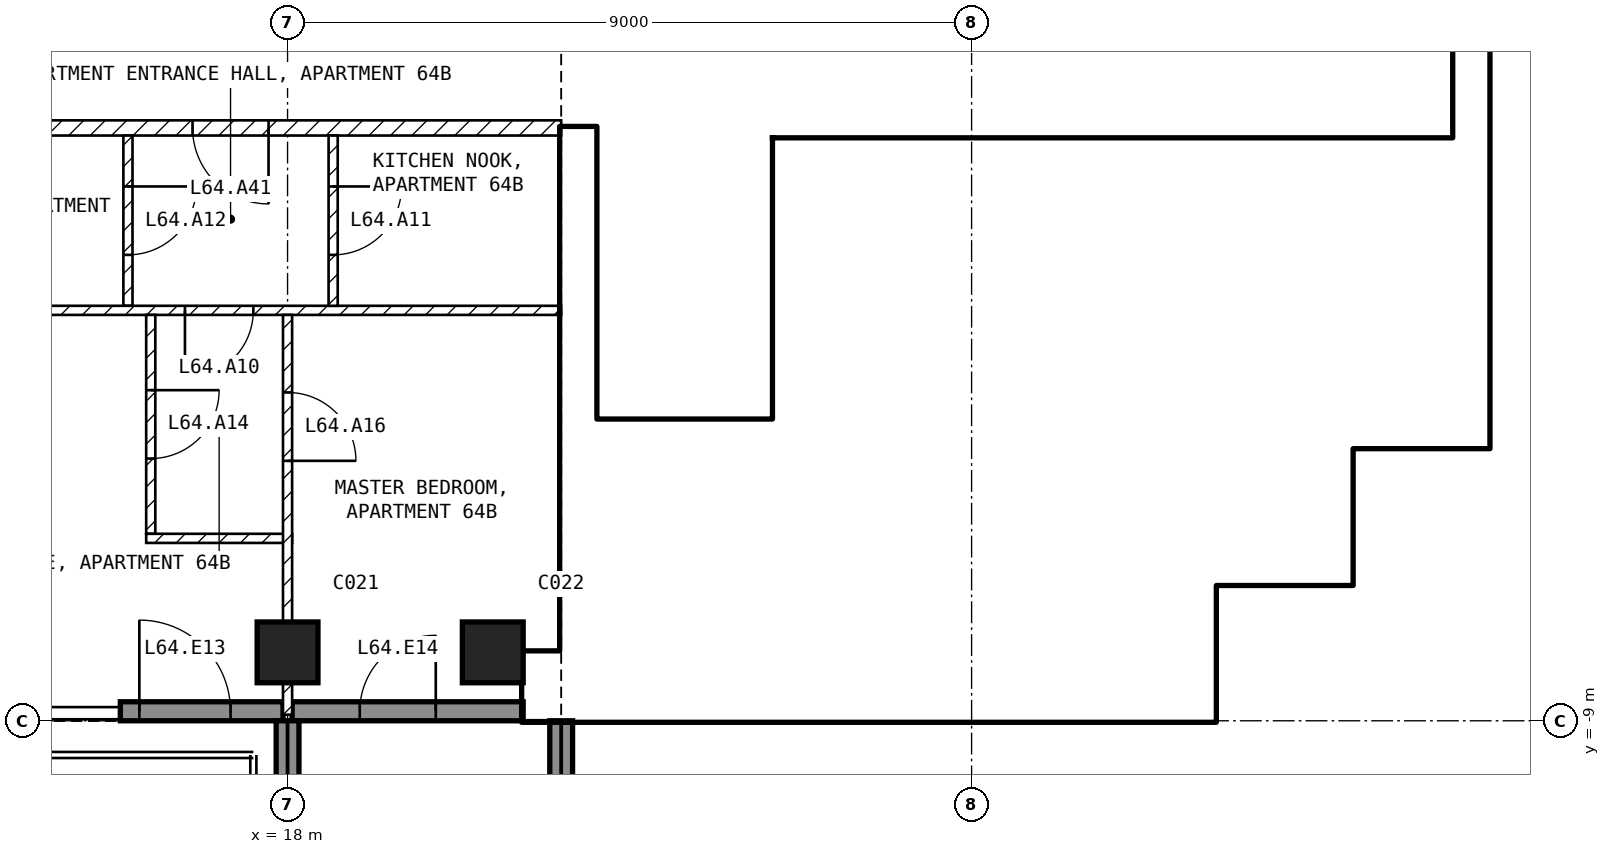
"""IFC4 building model, lengths in metres.
Left out: names, types, materials, properties, quantities, classifications, styles, units other than length and angle.
Written with IfcOpenShell. Run it as: python <this file> out.ifc"""

import sys

from ifc_helpers import new_model, si_unit, direction, frame, frame_2d, origin, origin_2d, place, context, subcontext, project, spatial, rectangle, extrude, element, fill, save


model = new_model("IFC4")
c1 = context("Model", 3, precision=1e-05, world=origin(), true_north=direction((0.0, 1.0)))
c2 = subcontext(c1, "Body", "Model", "MODEL_VIEW")
j1 = project(units=[si_unit("LENGTHUNIT", "METRE"), si_unit("PLANEANGLEUNIT", "RADIAN")], contexts=[c1])
p1 = place(None, origin())
s1 = spatial("IfcSite", under=j1, at=p1, CompositionType="ELEMENT")
p2 = place(p1, origin())
s2 = spatial("IfcBuilding", under=s1, at=p2, CompositionType="ELEMENT")
p3 = place(p2, frame((0.0, 0.0, 253.5)))
s3 = spatial("IfcBuildingStorey", under=s2, at=p3, CompositionType="ELEMENT", Elevation=253.5)
for number, where, z_axis, x_axis in (
    (1, (18.0, -8.1, -0.25), (0.0, 0.0, 1.0), (1.0, 0.0, 0.0)),
    (2, (20.7, -8.1, -0.25), (0.0, 0.0, 1.0), (1.0, 0.0, 0.0)),
):
    element("IfcColumn", number, at=place(p3, frame(where, z_axis=z_axis, x_axis=x_axis)), inside=s3, PredefinedType="COLUMN", context=c2, shape_type="SweptSolid", body=[
        extrude(rectangle(XDim=0.8, YDim=0.8, at=origin_2d()), origin(), (0.0, 0.0, 1.0), 3.5),
    ])
p4 = place(p3, frame((15.8, -8.875, 0.0), z_axis=(0.0, 0.0, 1.0), x_axis=(1.0, 0.0, 0.0)))
e3 = element("IfcWall", 3, at=p4, inside=s3, PredefinedType="SOLIDWALL", context=c2, shape_type="SweptSolid", body=[
    extrude(rectangle(XDim=2.14, YDim=0.25, at=frame_2d((1.07, 0.0))), origin(), (0.0, 0.0, 1.0), 3.25),
])
p5 = place(p4, frame((0.25, 0.0, 0.0)))
e4 = element("IfcOpeningElement", 4, at=p5, cuts=e3, PredefinedType="OPENING", context=c2, shape_type="SweptSolid", body=[
    extrude(rectangle(XDim=1.2, YDim=2.4, at=frame_2d((0.6, 1.2))), frame((0.0, 0.135, 0.0), z_axis=(0.0, -1.0, 0.0), x_axis=(1.0, 0.0, 0.0)), (0.0, 0.0, 1.0), 0.27),
])
p6 = place(p3, frame((18.06, -8.875, 0.0), z_axis=(0.0, 0.0, 1.0), x_axis=(1.0, 0.0, 0.0)))
e5 = element("IfcWall", 5, at=p6, inside=s3, PredefinedType="SOLIDWALL", context=c2, shape_type="SweptSolid", body=[
    extrude(rectangle(XDim=3.04, YDim=0.25, at=frame_2d((1.52, 0.0))), origin(), (0.0, 0.0, 1.0), 3.25),
])
p7 = place(p6, frame((0.89, 0.0, 0.0)))
e6 = element("IfcOpeningElement", 6, at=p7, cuts=e5, PredefinedType="OPENING", context=c2, shape_type="SweptSolid", body=[
    extrude(rectangle(XDim=1.0, YDim=2.4, at=frame_2d((0.5, 1.2))), frame((0.0, 0.135, 0.0), z_axis=(0.0, -1.0, 0.0), x_axis=(1.0, 0.0, 0.0)), (0.0, 0.0, 1.0), 0.27),
])
p8 = place(p3, frame((18.0, -9.0, 0.0), z_axis=(0.0, 0.0, 1.0), x_axis=(0.0, -1.0, 0.0)))
e7 = element("IfcWall", 7, at=p8, inside=s3, PredefinedType="SOLIDWALL", context=c2, shape_type="SweptSolid", body=[
    extrude(rectangle(XDim=2.74, YDim=0.3, at=frame_2d((1.37, 0.0))), origin(), (0.0, 0.0, 1.0), 3.25),
])
p9 = place(p3, frame((21.6, -9.0, 0.0), z_axis=(0.0, 0.0, 1.0), x_axis=(0.0, -1.0, 0.0)))
e8 = element("IfcWall", 8, at=p9, inside=s3, PredefinedType="SOLIDWALL", context=c2, shape_type="SweptSolid", body=[
    extrude(rectangle(XDim=2.7, YDim=0.3, at=frame_2d((1.35, 0.0))), origin(), (0.0, 0.0, 1.0), 3.25),
])
p10 = place(p3, frame((21.1, -8.55, 0.0), z_axis=(0.0, 0.0, 1.0), x_axis=(1.0, 0.0, 0.0)))
e9 = element("IfcWall", 9, at=p10, inside=s3, PredefinedType="SHEAR", context=c2, shape_type="SweptSolid", body=[
    extrude(rectangle(XDim=9.1, YDim=0.9, at=frame_2d((4.55, 0.0))), origin(), (0.0, 0.0, 1.0), 3.25),
])
p11 = place(p3, frame((29.975, -8.1, 0.0), z_axis=(0.0, 0.0, 1.0), x_axis=(0.0, 1.0, 0.0)))
e10 = element("IfcWall", 10, at=p11, inside=s3, PredefinedType="SHEAR", context=c2, shape_type="SweptSolid", body=[
    extrude(rectangle(XDim=1.35, YDim=0.45, at=frame_2d((0.675, 0.0))), origin(), (0.0, 0.0, 1.0), 3.25),
])
for number, where, z_axis, x_axis in (
    (11, (30.2, -6.975, 0.0), (0.0, 0.0, 1.0), (1.0, 0.0, 0.0)),
    (12, (31.775, -6.75, 0.0), (0.0, 0.0, 1.0), (0.0, 1.0, 0.0)),
    (13, (32.0, -5.175, 0.0), (0.0, 0.0, 1.0), (1.0, 0.0, 0.0)),
):
    element("IfcWall", number, at=place(p3, frame(where, z_axis=z_axis, x_axis=x_axis)), inside=s3, PredefinedType="SHEAR", context=c2, shape_type="SweptSolid", body=[
        extrude(rectangle(XDim=1.8, YDim=0.45, at=frame_2d((0.9, 0.0))), origin(), (0.0, 0.0, 1.0), 3.25),
    ])
p12 = place(p3, frame((33.575, -4.95, 0.0), z_axis=(0.0, 0.0, 1.0), x_axis=(0.0, 1.0, 0.0)))
e14 = element("IfcWall", 14, at=p12, inside=s3, PredefinedType="SHEAR", context=c2, shape_type="SweptSolid", body=[
    extrude(rectangle(XDim=10.35, YDim=0.45, at=frame_2d((5.175, 0.0))), origin(), (0.0, 0.0, 1.0), 3.25),
])
p13 = place(p3, frame((21.825, -8.1, 0.0), z_axis=(0.0, 0.0, 1.0), x_axis=(0.0, 1.0, 0.0)))
e15 = element("IfcWall", 15, at=p13, inside=s3, PredefinedType="SHEAR", context=c2, shape_type="SweptSolid", body=[
    extrude(rectangle(XDim=6.9, YDim=0.45, at=frame_2d((3.45, 0.0))), origin(), (0.0, 0.0, 1.0), 3.25),
])
p14 = place(p3, frame((24.5, -5.05, 0.0), z_axis=(0.0, 0.0, 1.0), x_axis=(0.0, 1.0, 0.0)))
e16 = element("IfcWall", 16, at=p14, inside=s3, PredefinedType="SOLIDWALL", context=c2, shape_type="SweptSolid", body=[
    extrude(rectangle(XDim=3.7, YDim=0.2, at=frame_2d((1.85, 0.0))), origin(), (0.0, 0.0, 1.0), 3.25),
])
p15 = place(p14, frame((0.1, 0.0, 0.0)))
e17 = element("IfcOpeningElement", 17, at=p15, cuts=e16, PredefinedType="OPENING", context=c2, shape_type="SweptSolid", body=[
    extrude(rectangle(XDim=0.8, YDim=2.1, at=frame_2d((0.4, 1.05))), frame((0.0, 0.11, 0.0), z_axis=(0.0, -1.0, 0.0), x_axis=(1.0, 0.0, 0.0)), (0.0, 0.0, 1.0), 0.22),
])
p16 = place(p3, frame((22.05, -5.15, 0.0), z_axis=(0.0, 0.0, 1.0), x_axis=(1.0, 0.0, 0.0)))
e18 = element("IfcWall", 18, at=p16, inside=s3, PredefinedType="SOLIDWALL", context=c2, shape_type="SweptSolid", body=[
    extrude(rectangle(XDim=6.3, YDim=0.2, at=frame_2d((3.15, 0.0))), origin(), (0.0, 0.0, 1.0), 3.25),
])
p17 = place(p16, frame((0.2, 0.0, 0.0)))
e19 = element("IfcOpeningElement", 19, at=p17, cuts=e18, PredefinedType="OPENING", context=c2, shape_type="SweptSolid", body=[
    extrude(rectangle(XDim=1.0, YDim=2.1, at=frame_2d((0.5, 1.05))), frame((0.0, 0.11, 0.0), z_axis=(0.0, -1.0, 0.0), x_axis=(1.0, 0.0, 0.0)), (0.0, 0.0, 1.0), 0.22),
])
p18 = place(p3, frame((28.25, -8.1, 0.0), z_axis=(0.0, 0.0, 1.0), x_axis=(0.0, 1.0, 0.0)))
e20 = element("IfcWall", 20, at=p18, inside=s3, PredefinedType="SOLIDWALL", context=c2, shape_type="SweptSolid", body=[
    extrude(rectangle(XDim=2.85, YDim=0.2, at=frame_2d((1.425, 0.0))), origin(), (0.0, 0.0, 1.0), 3.25),
])
p19 = place(p3, frame((24.6, -1.45, 0.0), z_axis=(0.0, 0.0, 1.0), x_axis=(1.0, 0.0, 0.0)))
e21 = element("IfcWall", 21, at=p19, inside=s3, PredefinedType="SOLIDWALL", context=c2, shape_type="SweptSolid", body=[
    extrude(rectangle(XDim=8.75, YDim=0.2, at=frame_2d((4.375, 0.0))), origin(), (0.0, 0.0, 1.0), 3.25),
])
p20 = place(p19, frame((0.4, 0.0, 0.0)))
e22 = element("IfcOpeningElement", 22, at=p20, cuts=e21, PredefinedType="OPENING", context=c2, shape_type="SweptSolid", body=[
    extrude(rectangle(XDim=1.0, YDim=2.1, at=frame_2d((0.5, 1.05))), frame((0.0, 0.11, 0.0), z_axis=(0.0, -1.0, 0.0), x_axis=(1.0, 0.0, 0.0)), (0.0, 0.0, 1.0), 0.22),
])
p21 = place(p19, frame((2.4, 0.0, 0.0)))
e23 = element("IfcOpeningElement", 23, at=p21, cuts=e21, PredefinedType="OPENING", context=c2, shape_type="SweptSolid", body=[
    extrude(rectangle(XDim=1.0, YDim=2.1, at=frame_2d((0.5, 1.05))), frame((0.0, 0.11, 0.0), z_axis=(0.0, -1.0, 0.0), x_axis=(1.0, 0.0, 0.0)), (0.0, 0.0, 1.0), 0.22),
])
p22 = place(p19, frame((4.4, 0.0, 0.0)))
e24 = element("IfcOpeningElement", 24, at=p22, cuts=e21, PredefinedType="OPENING", context=c2, shape_type="SweptSolid", body=[
    extrude(rectangle(XDim=1.0, YDim=2.1, at=frame_2d((0.5, 1.05))), frame((0.0, 0.11, 0.0), z_axis=(0.0, -1.0, 0.0), x_axis=(1.0, 0.0, 0.0)), (0.0, 0.0, 1.0), 0.22),
])
p23 = place(p19, frame((6.925, 0.0, 0.0)))
e25 = element("IfcOpeningElement", 25, at=p23, cuts=e21, PredefinedType="OPENING", context=c2, shape_type="SweptSolid", body=[
    extrude(rectangle(XDim=0.9, YDim=2.1, at=frame_2d((0.45, 1.05))), frame((0.0, 0.11, 0.0), z_axis=(0.0, -1.0, 0.0), x_axis=(1.0, 0.0, 0.0)), (0.0, 0.0, 1.0), 0.22),
])
p24 = place(p3, frame((24.6, -3.95, 0.0), z_axis=(0.0, 0.0, 1.0), x_axis=(1.0, 0.0, 0.0)))
e26 = element("IfcWall", 26, at=p24, inside=s3, PredefinedType="SOLIDWALL", context=c2, shape_type="SweptSolid", body=[
    extrude(rectangle(XDim=8.75, YDim=0.2, at=frame_2d((4.375, 0.0))), origin(), (0.0, 0.0, 1.0), 3.25),
])
for number, where, z_axis, x_axis in (
    (27, (26.5, -3.85, 0.0), (0.0, 0.0, 1.0), (0.0, 1.0, 0.0)),
    (28, (28.5, -3.85, 0.0), (0.0, 0.0, 1.0), (0.0, 1.0, 0.0)),
    (29, (30.5, -3.85, 0.0), (0.0, 0.0, 1.0), (0.0, 1.0, 0.0)),
):
    element("IfcWall", number, at=place(p3, frame(where, z_axis=z_axis, x_axis=x_axis)), inside=s3, PredefinedType="SOLIDWALL", context=c2, shape_type="SweptSolid", body=[
        extrude(rectangle(XDim=2.3, YDim=0.2, at=frame_2d((1.15, 0.0))), origin(), (0.0, 0.0, 1.0), 3.25),
    ])
p25 = place(p3, frame((21.6, -1.2, 0.0), z_axis=(0.0, 0.0, 1.0), x_axis=(-1.0, 0.0, 0.0)))
e30 = element("IfcWall", 30, at=p25, inside=s3, PredefinedType="PARTITIONING", context=c2, shape_type="SweptSolid", body=[
    extrude(rectangle(XDim=17.2, YDim=0.2, at=frame_2d((8.6, 0.0))), origin(), (0.0, 0.0, 1.0), 3.25),
])
p26 = place(p25, frame((3.85, 0.0, 0.0)))
e31 = element("IfcOpeningElement", 31, at=p26, cuts=e30, PredefinedType="OPENING", context=c2, shape_type="SweptSolid", body=[
    extrude(rectangle(XDim=1.0, YDim=2.1, at=frame_2d((0.5, 1.05))), frame((0.0, 0.11, 0.0), z_axis=(0.0, -1.0, 0.0), x_axis=(1.0, 0.0, 0.0)), (0.0, 0.0, 1.0), 0.22),
])
p27 = place(p3, frame((15.9, -1.3, 0.0), z_axis=(0.0, 0.0, 1.0), x_axis=(0.0, -1.0, 0.0)))
e32 = element("IfcWall", 32, at=p27, inside=s3, PredefinedType="PARTITIONING", context=c2, shape_type="SweptSolid", body=[
    extrude(rectangle(XDim=2.24, YDim=0.12, at=frame_2d((1.12, 0.0))), origin(), (0.0, 0.0, 1.0), 3.25),
])
p28 = place(p27, frame((0.67, 0.0, 0.0)))
e33 = element("IfcOpeningElement", 33, at=p28, cuts=e32, PredefinedType="OPENING", context=c2, shape_type="SweptSolid", body=[
    extrude(rectangle(XDim=0.9, YDim=2.1, at=frame_2d((0.45, 1.05))), frame((0.0, 0.07, 0.0), z_axis=(0.0, -1.0, 0.0), x_axis=(1.0, 0.0, 0.0)), (0.0, 0.0, 1.0), 0.14),
])
p29 = place(p3, frame((21.6, -3.6, 0.0), z_axis=(0.0, 0.0, 1.0), x_axis=(-1.0, 0.0, 0.0)))
e34 = element("IfcWall", 34, at=p29, inside=s3, PredefinedType="PARTITIONING", context=c2, shape_type="SweptSolid", body=[
    extrude(rectangle(XDim=9.0, YDim=0.12, at=frame_2d((4.5, 0.0))), origin(), (0.0, 0.0, 1.0), 3.25),
])
p30 = place(p29, frame((4.05, 0.0, 0.0)))
e35 = element("IfcOpeningElement", 35, at=p30, cuts=e34, PredefinedType="OPENING", context=c2, shape_type="SweptSolid", body=[
    extrude(rectangle(XDim=0.9, YDim=2.1, at=frame_2d((0.45, 1.05))), frame((0.0, 0.07, 0.0), z_axis=(0.0, -1.0, 0.0), x_axis=(1.0, 0.0, 0.0)), (0.0, 0.0, 1.0), 0.14),
])
p31 = place(p3, frame((18.6, -1.3, 0.0), z_axis=(0.0, 0.0, 1.0), x_axis=(0.0, -1.0, 0.0)))
e36 = element("IfcWall", 36, at=p31, inside=s3, PredefinedType="PARTITIONING", context=c2, shape_type="SweptSolid", body=[
    extrude(rectangle(XDim=2.24, YDim=0.12, at=frame_2d((1.12, 0.0))), origin(), (0.0, 0.0, 1.0), 3.25),
])
p32 = place(p31, frame((0.67, 0.0, 0.0)))
e37 = element("IfcOpeningElement", 37, at=p32, cuts=e36, PredefinedType="OPENING", context=c2, shape_type="SweptSolid", body=[
    extrude(rectangle(XDim=0.9, YDim=2.1, at=frame_2d((0.45, 1.05))), frame((0.0, 0.07, 0.0), z_axis=(0.0, -1.0, 0.0), x_axis=(1.0, 0.0, 0.0)), (0.0, 0.0, 1.0), 0.14),
])
p33 = place(p3, frame((16.2, -3.66, 0.0), z_axis=(0.0, 0.0, 1.0), x_axis=(0.0, -1.0, 0.0)))
e38 = element("IfcWall", 38, at=p33, inside=s3, PredefinedType="PARTITIONING", context=c2, shape_type="SweptSolid", body=[
    extrude(rectangle(XDim=2.88, YDim=0.12, at=frame_2d((1.44, 0.0))), origin(), (0.0, 0.0, 1.0), 3.25),
])
p34 = place(p33, frame((0.99, 0.0, 0.0)))
e39 = element("IfcOpeningElement", 39, at=p34, cuts=e38, PredefinedType="OPENING", context=c2, shape_type="SweptSolid", body=[
    extrude(rectangle(XDim=0.9, YDim=2.1, at=frame_2d((0.45, 1.05))), frame((0.0, 0.07, 0.0), z_axis=(0.0, -1.0, 0.0), x_axis=(1.0, 0.0, 0.0)), (0.0, 0.0, 1.0), 0.14),
])
p35 = place(p3, frame((16.14, -6.6, 0.0), z_axis=(0.0, 0.0, 1.0), x_axis=(1.0, 0.0, 0.0)))
e40 = element("IfcWall", 40, at=p35, inside=s3, PredefinedType="PARTITIONING", context=c2, shape_type="SweptSolid", body=[
    extrude(rectangle(XDim=1.92, YDim=0.12, at=frame_2d((0.96, 0.0))), origin(), (0.0, 0.0, 1.0), 3.25),
])
p36 = place(p3, frame((18.0, -3.66, 0.0), z_axis=(0.0, 0.0, 1.0), x_axis=(0.0, -1.0, 0.0)))
e41 = element("IfcWall", 41, at=p36, inside=s3, PredefinedType="PARTITIONING", context=c2, shape_type="SweptSolid", body=[
    extrude(rectangle(XDim=5.26, YDim=0.12, at=frame_2d((2.63, 0.0))), origin(), (0.0, 0.0, 1.0), 2.496),
])
p37 = place(p36, frame((1.02, 0.0, 0.0)))
e42 = element("IfcOpeningElement", 42, at=p37, cuts=e41, PredefinedType="OPENING", context=c2, shape_type="SweptSolid", body=[
    extrude(rectangle(XDim=0.9, YDim=2.1, at=frame_2d((0.45, 1.05))), frame((0.0, 0.07, 0.0), z_axis=(0.0, -1.0, 0.0), x_axis=(1.0, 0.0, 0.0)), (0.0, 0.0, 1.0), 0.14),
])
p38 = place(p5, origin())
e43 = element("IfcDoor", 43, at=p38, inside=s3, OperationType="SINGLE_SWING_LEFT", PredefinedType="DOOR", context=c2, shape_type="SweptSolid", body=[
    extrude(rectangle(XDim=1.2, YDim=2.4, at=frame_2d((0.6, 1.2))), frame((0.0, 0.025, 0.0), z_axis=(0.0, -1.0, 0.0), x_axis=(1.0, 0.0, 0.0)), (0.0, 0.0, 1.0), 0.05),
])
fill(e4, e43)
p39 = place(p7, origin())
e44 = element("IfcDoor", 44, at=p39, inside=s3, OperationType="SINGLE_SWING_RIGHT", PredefinedType="DOOR", context=c2, shape_type="SweptSolid", body=[
    extrude(rectangle(XDim=1.0, YDim=2.4, at=frame_2d((0.5, 1.2))), frame((0.0, 0.025, 0.0), z_axis=(0.0, -1.0, 0.0), x_axis=(1.0, 0.0, 0.0)), (0.0, 0.0, 1.0), 0.05),
])
fill(e6, e44)
p40 = place(p20, origin())
e45 = element("IfcDoor", 45, at=p40, inside=s3, OperationType="DOUBLE_DOOR_SLIDING", PredefinedType="DOOR", context=c2, shape_type="SweptSolid", body=[
    extrude(rectangle(XDim=1.0, YDim=2.1, at=frame_2d((0.5, 1.05))), frame((0.0, 0.025, 0.0), z_axis=(0.0, -1.0, 0.0), x_axis=(1.0, 0.0, 0.0)), (0.0, 0.0, 1.0), 0.05),
])
fill(e22, e45)
p41 = place(p21, origin())
e46 = element("IfcDoor", 46, at=p41, inside=s3, OperationType="DOUBLE_DOOR_SLIDING", PredefinedType="DOOR", context=c2, shape_type="SweptSolid", body=[
    extrude(rectangle(XDim=1.0, YDim=2.1, at=frame_2d((0.5, 1.05))), frame((0.0, 0.025, 0.0), z_axis=(0.0, -1.0, 0.0), x_axis=(1.0, 0.0, 0.0)), (0.0, 0.0, 1.0), 0.05),
])
fill(e23, e46)
p42 = place(p22, origin())
e47 = element("IfcDoor", 47, at=p42, inside=s3, OperationType="DOUBLE_DOOR_SLIDING", PredefinedType="DOOR", context=c2, shape_type="SweptSolid", body=[
    extrude(rectangle(XDim=1.0, YDim=2.1, at=frame_2d((0.5, 1.05))), frame((0.0, 0.025, 0.0), z_axis=(0.0, -1.0, 0.0), x_axis=(1.0, 0.0, 0.0)), (0.0, 0.0, 1.0), 0.05),
])
fill(e24, e47)
p43 = place(p17, origin())
e48 = element("IfcDoor", 48, at=p43, inside=s3, OperationType="SINGLE_SWING_LEFT", PredefinedType="DOOR", context=c2, shape_type="SweptSolid", body=[
    extrude(rectangle(XDim=1.0, YDim=2.1, at=frame_2d((0.5, 1.05))), frame((0.0, 0.025, 0.0), z_axis=(0.0, -1.0, 0.0), x_axis=(1.0, 0.0, 0.0)), (0.0, 0.0, 1.0), 0.05),
])
fill(e19, e48)
p44 = place(p15, origin())
e49 = element("IfcDoor", 49, at=p44, inside=s3, OperationType="SINGLE_SWING_LEFT", PredefinedType="DOOR", context=c2, shape_type="SweptSolid", body=[
    extrude(rectangle(XDim=0.8, YDim=2.1, at=frame_2d((0.4, 1.05))), frame((0.0, 0.025, 0.0), z_axis=(0.0, -1.0, 0.0), x_axis=(1.0, 0.0, 0.0)), (0.0, 0.0, 1.0), 0.05),
])
fill(e17, e49)
p45 = place(p23, origin())
e50 = element("IfcDoor", 50, at=p45, inside=s3, OperationType="SINGLE_SWING_LEFT", PredefinedType="DOOR", context=c2, shape_type="SweptSolid", body=[
    extrude(rectangle(XDim=0.9, YDim=2.1, at=frame_2d((0.45, 1.05))), frame((0.0, 0.025, 0.0), z_axis=(0.0, -1.0, 0.0), x_axis=(1.0, 0.0, 0.0)), (0.0, 0.0, 1.0), 0.05),
])
fill(e25, e50)
p46 = place(p30, origin())
e51 = element("IfcDoor", 51, at=p46, inside=s3, OperationType="SINGLE_SWING_RIGHT", PredefinedType="DOOR", context=c2, shape_type="SweptSolid", body=[
    extrude(rectangle(XDim=0.9, YDim=2.1, at=frame_2d((0.45, 1.05))), frame((0.0, 0.025, 0.0), z_axis=(0.0, -1.0, 0.0), x_axis=(1.0, 0.0, 0.0)), (0.0, 0.0, 1.0), 0.05),
])
fill(e35, e51)
p47 = place(p32, origin())
e52 = element("IfcDoor", 52, at=p47, inside=s3, OperationType="SINGLE_SWING_LEFT", PredefinedType="DOOR", context=c2, shape_type="SweptSolid", body=[
    extrude(rectangle(XDim=0.9, YDim=2.1, at=frame_2d((0.45, 1.05))), frame((0.0, 0.025, 0.0), z_axis=(0.0, -1.0, 0.0), x_axis=(1.0, 0.0, 0.0)), (0.0, 0.0, 1.0), 0.05),
])
fill(e37, e52)
p48 = place(p28, origin())
e53 = element("IfcDoor", 53, at=p48, inside=s3, OperationType="SINGLE_SWING_LEFT", PredefinedType="DOOR", context=c2, shape_type="SweptSolid", body=[
    extrude(rectangle(XDim=0.9, YDim=2.1, at=frame_2d((0.45, 1.05))), frame((0.0, 0.025, 0.0), z_axis=(0.0, -1.0, 0.0), x_axis=(1.0, 0.0, 0.0)), (0.0, 0.0, 1.0), 0.05),
])
fill(e33, e53)
p49 = place(p34, origin())
e54 = element("IfcDoor", 54, at=p49, inside=s3, OperationType="SINGLE_SWING_LEFT", PredefinedType="DOOR", context=c2, shape_type="SweptSolid", body=[
    extrude(rectangle(XDim=0.9, YDim=2.1, at=frame_2d((0.45, 1.05))), frame((0.0, 0.025, 0.0), z_axis=(0.0, -1.0, 0.0), x_axis=(1.0, 0.0, 0.0)), (0.0, 0.0, 1.0), 0.05),
])
fill(e39, e54)
p50 = place(p37, origin())
e55 = element("IfcDoor", 55, at=p50, inside=s3, OperationType="SINGLE_SWING_RIGHT", PredefinedType="DOOR", context=c2, shape_type="SweptSolid", body=[
    extrude(rectangle(XDim=0.9, YDim=2.1, at=frame_2d((0.45, 1.05))), frame((0.0, 0.025, 0.0), z_axis=(0.0, -1.0, 0.0), x_axis=(1.0, 0.0, 0.0)), (0.0, 0.0, 1.0), 0.05),
])
fill(e42, e55)
p51 = place(p26, origin())
e56 = element("IfcDoor", 56, at=p51, inside=s3, OperationType="SINGLE_SWING_LEFT", PredefinedType="DOOR", context=c2, shape_type="SweptSolid", body=[
    extrude(rectangle(XDim=1.0, YDim=2.1, at=frame_2d((0.5, 1.05))), frame((0.0, 0.025, 0.0), z_axis=(0.0, -1.0, 0.0), x_axis=(1.0, 0.0, 0.0)), (0.0, 0.0, 1.0), 0.05),
])
fill(e31, e56)
save(model, sys.argv[1])
